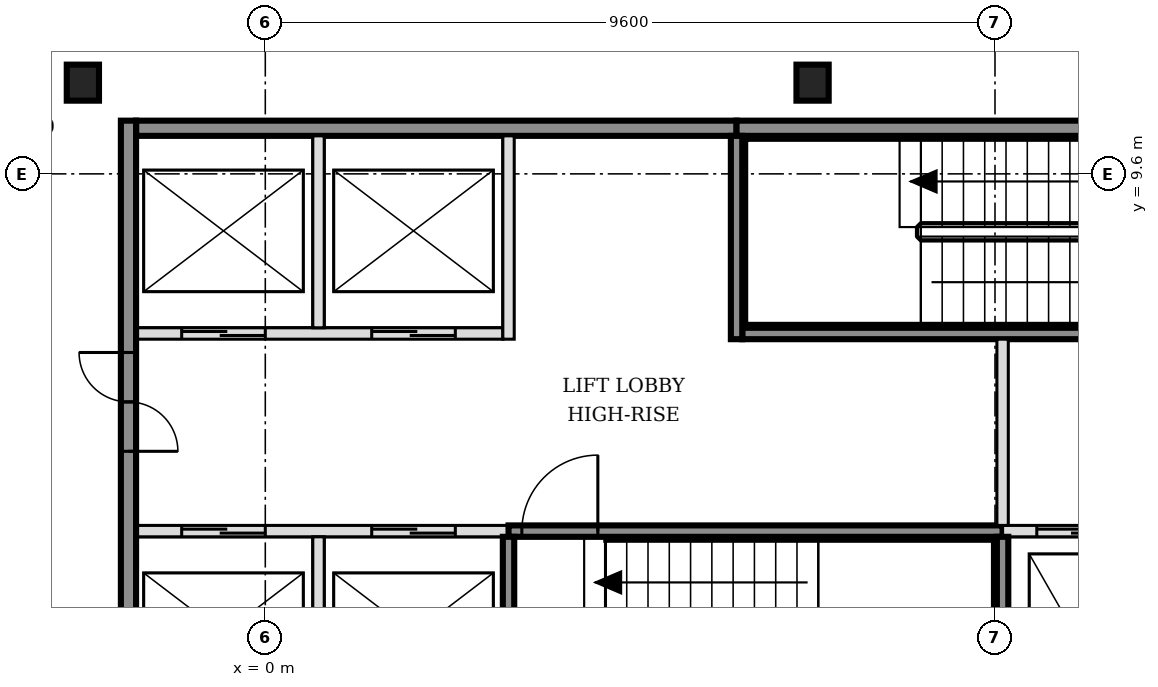
"""IFC4 building model, lengths in metres.
Left out: names, types, materials, properties, quantities, classifications, styles, units other than length and angle.
Written with IfcOpenShell. Run it as: python <this file> out.ifc"""

import sys

from ifc_helpers import new_model, si_unit, direction, frame, frame_2d, origin, origin_2d, place, context, subcontext, project, spatial, rectangle, i_section, extrude, element, fill, save


model = new_model("IFC4")
c1 = context("Model", 3, precision=1e-05, world=origin(), true_north=direction((0.0, 1.0)))
c2 = subcontext(c1, "Body", "Model", "MODEL_VIEW")
j1 = project(units=[si_unit("LENGTHUNIT", "METRE"), si_unit("PLANEANGLEUNIT", "RADIAN")], contexts=[c1])
p1 = place(None, origin())
s1 = spatial("IfcSite", under=j1, at=p1, CompositionType="ELEMENT")
p2 = place(p1, origin())
s2 = spatial("IfcBuilding", under=s1, at=p2, CompositionType="ELEMENT")
p3 = place(p2, frame((0.0, 0.0, 136.2)))
s3 = spatial("IfcBuildingStorey", under=s2, at=p3, CompositionType="ELEMENT", Elevation=136.2)
for number, where, z_axis, x_axis in (
    (1, (-2.4, 10.8, -0.15), (0.0, 0.0, 1.0), (1.0, 0.0, 0.0)),
    (2, (7.2, 10.8, -0.15), (0.0, 0.0, 1.0), (1.0, 0.0, 0.0)),
):
    element("IfcColumn", number, at=place(p3, frame(where, z_axis=z_axis, x_axis=x_axis)), inside=s3, PredefinedType="COLUMN", context=c2, shape_type="SweptSolid", body=[
        extrude(i_section(OverallWidth=0.424, OverallDepth=0.474, WebThickness=0.048, FlangeThickness=0.077, FilletRadius=0.015, at=origin_2d()), origin(), (0.0, 0.0, 1.0), 3.6),
    ])
p4 = place(p3, frame((-1.7, 4.9, 0.0), z_axis=(0.0, 0.0, 1.0), x_axis=(1.0, 0.0, 0.0)))
e3 = element("IfcWall", 3, at=p4, inside=s3, PredefinedType="SOLIDWALL", context=c2, shape_type="SweptSolid", body=[
    extrude(rectangle(XDim=4.9, YDim=0.15, at=frame_2d((2.45, 0.0))), origin(), (0.0, 0.0, 1.0), 3.45),
])
p5 = place(p4, frame((0.6, 0.0, 0.0)))
e4 = element("IfcOpeningElement", 4, at=p5, cuts=e3, PredefinedType="OPENING", context=c2, shape_type="SweptSolid", body=[
    extrude(rectangle(XDim=1.1, YDim=2.1, at=frame_2d((0.55, 1.05))), frame((0.0, 0.085, 0.0), z_axis=(0.0, -1.0, 0.0), x_axis=(1.0, 0.0, 0.0)), (0.0, 0.0, 1.0), 0.17),
])
p6 = place(p4, frame((3.1, 0.0, 0.0)))
e5 = element("IfcOpeningElement", 5, at=p6, cuts=e3, PredefinedType="OPENING", context=c2, shape_type="SweptSolid", body=[
    extrude(rectangle(XDim=1.1, YDim=2.1, at=frame_2d((0.55, 1.05))), frame((0.0, 0.085, 0.0), z_axis=(0.0, -1.0, 0.0), x_axis=(1.0, 0.0, 0.0)), (0.0, 0.0, 1.0), 0.17),
])
p7 = place(p3, frame((3.2, 4.9, 0.0), z_axis=(0.0, 0.0, 1.0), x_axis=(1.0, 0.0, 0.0)))
e6 = element("IfcWall", 6, at=p7, inside=s3, PredefinedType="SOLIDWALL", context=c2, shape_type="SweptSolid", body=[
    extrude(rectangle(XDim=6.5, YDim=0.15, at=frame_2d((3.25, 0.0))), origin(), (0.0, 0.0, 1.0), 3.45),
])
p8 = place(p7, frame((0.175, 0.0, 0.0)))
e7 = element("IfcOpeningElement", 7, at=p8, cuts=e6, PredefinedType="OPENING", context=c2, shape_type="SweptSolid", body=[
    extrude(rectangle(XDim=1.0, YDim=2.1, at=frame_2d((0.5, 1.05))), frame((0.0, 0.085, 0.0), z_axis=(0.0, -1.0, 0.0), x_axis=(1.0, 0.0, 0.0)), (0.0, 0.0, 1.0), 0.17),
])
p9 = place(p3, frame((9.7, 4.9, 0.0), z_axis=(0.0, 0.0, 1.0), x_axis=(1.0, 0.0, 0.0)))
e8 = element("IfcWall", 8, at=p9, inside=s3, PredefinedType="SOLIDWALL", context=c2, shape_type="SweptSolid", body=[
    extrude(rectangle(XDim=6.4, YDim=0.15, at=frame_2d((3.2, 0.0))), origin(), (0.0, 0.0, 1.0), 3.45),
])
p10 = place(p9, frame((0.45, 0.0, 0.0)))
e9 = element("IfcOpeningElement", 9, at=p10, cuts=e8, PredefinedType="OPENING", context=c2, shape_type="SweptSolid", body=[
    extrude(rectangle(XDim=1.0, YDim=2.1, at=frame_2d((0.5, 1.05))), frame((0.0, 0.085, 0.0), z_axis=(0.0, -1.0, 0.0), x_axis=(1.0, 0.0, 0.0)), (0.0, 0.0, 1.0), 0.17),
])
p11 = place(p9, frame((2.35, 0.0, 0.0)))
e10 = element("IfcOpeningElement", 10, at=p11, cuts=e8, PredefinedType="OPENING", context=c2, shape_type="SweptSolid", body=[
    extrude(rectangle(XDim=1.0, YDim=2.1, at=frame_2d((0.5, 1.05))), frame((0.0, 0.085, 0.0), z_axis=(0.0, -1.0, 0.0), x_axis=(1.0, 0.0, 0.0)), (0.0, 0.0, 1.0), 0.17),
])
p12 = place(p9, frame((4.7, 0.0, 0.0)))
e11 = element("IfcOpeningElement", 11, at=p12, cuts=e8, PredefinedType="OPENING", context=c2, shape_type="SweptSolid", body=[
    extrude(rectangle(XDim=0.9, YDim=2.1, at=frame_2d((0.45, 1.05))), frame((0.0, 0.085, 0.0), z_axis=(0.0, -1.0, 0.0), x_axis=(1.0, 0.0, 0.0)), (0.0, 0.0, 1.0), 0.17),
])
p13 = place(p3, frame((-1.7, 7.5, 0.0), z_axis=(0.0, 0.0, 1.0), x_axis=(1.0, 0.0, 0.0)))
e12 = element("IfcWall", 12, at=p13, inside=s3, PredefinedType="SOLIDWALL", context=c2, shape_type="SweptSolid", body=[
    extrude(rectangle(XDim=4.825, YDim=0.15, at=frame_2d((2.413, 0.0))), origin(), (0.0, 0.0, 1.0), 3.45),
])
p14 = place(p13, frame((0.6, 0.0, 0.0)))
e13 = element("IfcOpeningElement", 13, at=p14, cuts=e12, PredefinedType="OPENING", context=c2, shape_type="SweptSolid", body=[
    extrude(rectangle(XDim=1.1, YDim=2.1, at=frame_2d((0.55, 1.05))), frame((0.0, 0.085, 0.0), z_axis=(0.0, -1.0, 0.0), x_axis=(1.0, 0.0, 0.0)), (0.0, 0.0, 1.0), 0.17),
])
p15 = place(p13, frame((3.1, 0.0, 0.0)))
e14 = element("IfcOpeningElement", 14, at=p15, cuts=e12, PredefinedType="OPENING", context=c2, shape_type="SweptSolid", body=[
    extrude(rectangle(XDim=1.1, YDim=2.1, at=frame_2d((0.55, 1.05))), frame((0.0, 0.085, 0.0), z_axis=(0.0, -1.0, 0.0), x_axis=(1.0, 0.0, 0.0)), (0.0, 0.0, 1.0), 0.17),
])
p16 = place(p3, frame((6.275, 7.5, 0.0), z_axis=(0.0, 0.0, 1.0), x_axis=(1.0, 0.0, 0.0)))
e15 = element("IfcWall", 15, at=p16, inside=s3, PredefinedType="SOLIDWALL", context=c2, shape_type="SweptSolid", body=[
    extrude(rectangle(XDim=6.425, YDim=0.15, at=frame_2d((3.212, 0.0))), origin(), (0.0, 0.0, 1.0), 3.45),
])
p17 = place(p16, frame((5.225, 0.0, 0.0)))
e16 = element("IfcOpeningElement", 16, at=p17, cuts=e15, PredefinedType="OPENING", context=c2, shape_type="SweptSolid", body=[
    extrude(rectangle(XDim=1.0, YDim=2.1, at=frame_2d((0.5, 1.05))), frame((0.0, 0.085, 0.0), z_axis=(0.0, -1.0, 0.0), x_axis=(1.0, 0.0, 0.0)), (0.0, 0.0, 1.0), 0.17),
])
p18 = place(p3, frame((-1.7, 10.2, 0.0), z_axis=(0.0, 0.0, 1.0), x_axis=(1.0, 0.0, 0.0)))
e17 = element("IfcWall", 17, at=p18, inside=s3, PredefinedType="SOLIDWALL", context=c2, shape_type="SweptSolid", body=[
    extrude(rectangle(XDim=7.9, YDim=0.2, at=frame_2d((3.95, 0.0))), origin(), (0.0, 0.0, 1.0), 3.45),
])
p19 = place(p3, frame((6.2, 10.2, 0.0), z_axis=(0.0, 0.0, 1.0), x_axis=(1.0, 0.0, 0.0)))
e18 = element("IfcWall", 18, at=p19, inside=s3, PredefinedType="SOLIDWALL", context=c2, shape_type="SweptSolid", body=[
    extrude(rectangle(XDim=6.5, YDim=0.2, at=frame_2d((3.25, 0.0))), origin(), (0.0, 0.0, 1.0), 3.45),
])
p20 = place(p3, frame((-1.8, -5.5, 0.0), z_axis=(0.0, 0.0, 1.0), x_axis=(0.0, 1.0, 0.0)))
e19 = element("IfcWall", 19, at=p20, inside=s3, PredefinedType="SOLIDWALL", context=c2, shape_type="SweptSolid", body=[
    extrude(rectangle(XDim=15.8, YDim=0.2, at=frame_2d((7.9, 0.0))), origin(), (0.0, 0.0, 1.0), 3.45),
])
p21 = place(p20, frame((3.05, 0.0, 0.0)))
e20 = element("IfcOpeningElement", 20, at=p21, cuts=e19, PredefinedType="OPENING", context=c2, shape_type="SweptSolid", body=[
    extrude(rectangle(XDim=1.3, YDim=2.1, at=frame_2d((0.65, 1.05))), frame((0.0, 0.11, 0.0), z_axis=(0.0, -1.0, 0.0), x_axis=(1.0, 0.0, 0.0)), (0.0, 0.0, 1.0), 0.22),
])
p22 = place(p20, frame((11.45, 0.0, 0.0)))
e21 = element("IfcOpeningElement", 21, at=p22, cuts=e19, PredefinedType="OPENING", context=c2, shape_type="SweptSolid", body=[
    extrude(rectangle(XDim=1.3, YDim=2.1, at=frame_2d((0.65, 1.05))), frame((0.0, 0.11, 0.0), z_axis=(0.0, -1.0, 0.0), x_axis=(1.0, 0.0, 0.0)), (0.0, 0.0, 1.0), 0.22),
])
p23 = place(p3, frame((0.7, 2.275, 0.0), z_axis=(0.0, 0.0, 1.0), x_axis=(0.0, 1.0, 0.0)))
e22 = element("IfcWall", 22, at=p23, inside=s3, PredefinedType="SOLIDWALL", context=c2, shape_type="SweptSolid", body=[
    extrude(rectangle(XDim=2.55, YDim=0.15, at=frame_2d((1.275, 0.0))), origin(), (0.0, 0.0, 1.0), 3.45),
])
p24 = place(p3, frame((0.7, 7.575, 0.0), z_axis=(0.0, 0.0, 1.0), x_axis=(0.0, 1.0, 0.0)))
e23 = element("IfcWall", 23, at=p24, inside=s3, PredefinedType="SOLIDWALL", context=c2, shape_type="SweptSolid", body=[
    extrude(rectangle(XDim=2.525, YDim=0.15, at=frame_2d((1.263, 0.0))), origin(), (0.0, 0.0, 1.0), 3.45),
])
p25 = place(p3, frame((3.2, 2.275, 0.0), z_axis=(0.0, 0.0, 1.0), x_axis=(0.0, 1.0, 0.0)))
e24 = element("IfcWall", 24, at=p25, inside=s3, PredefinedType="SOLIDWALL", context=c2, shape_type="SweptSolid", body=[
    extrude(rectangle(XDim=2.55, YDim=0.15, at=frame_2d((1.275, 0.0))), origin(), (0.0, 0.0, 1.0), 3.45),
])
for number, where, z_axis, x_axis in (
    (25, (3.2, 7.425, 0.0), (0.0, 0.0, 1.0), (0.0, 1.0, 0.0)),
    (26, (6.2, 7.425, 0.0), (0.0, 0.0, 1.0), (0.0, 1.0, 0.0)),
):
    element("IfcWall", number, at=place(p3, frame(where, z_axis=z_axis, x_axis=x_axis)), inside=s3, PredefinedType="SOLIDWALL", context=c2, shape_type="SweptSolid", body=[
        extrude(rectangle(XDim=2.675, YDim=0.15, at=frame_2d((1.337, 0.0))), origin(), (0.0, 0.0, 1.0), 3.45),
    ])
p26 = place(p3, frame((9.7, 2.275, 0.0), z_axis=(0.0, 0.0, 1.0), x_axis=(0.0, 1.0, 0.0)))
e27 = element("IfcWall", 27, at=p26, inside=s3, PredefinedType="SOLIDWALL", context=c2, shape_type="SweptSolid", body=[
    extrude(rectangle(XDim=2.55, YDim=0.15, at=frame_2d((1.275, 0.0))), origin(), (0.0, 0.0, 1.0), 3.45),
])
p27 = place(p3, frame((9.7, 4.975, 0.0), z_axis=(0.0, 0.0, 1.0), x_axis=(0.0, 1.0, 0.0)))
e28 = element("IfcWall", 28, at=p27, inside=s3, PredefinedType="SOLIDWALL", context=c2, shape_type="SweptSolid", body=[
    extrude(rectangle(XDim=2.45, YDim=0.15, at=frame_2d((1.225, 0.0))), origin(), (0.0, 0.0, 1.0), 3.45),
])
p28 = place(p5, origin())
e29 = element("IfcDoor", 29, at=p28, inside=s3, OperationType="DOUBLE_DOOR_SLIDING", PredefinedType="DOOR", context=c2, shape_type="SweptSolid", body=[
    extrude(rectangle(XDim=1.1, YDim=2.1, at=frame_2d((0.55, 1.05))), frame((0.0, 0.025, 0.0), z_axis=(0.0, -1.0, 0.0), x_axis=(1.0, 0.0, 0.0)), (0.0, 0.0, 1.0), 0.05),
])
fill(e4, e29)
p29 = place(p6, origin())
e30 = element("IfcDoor", 30, at=p29, inside=s3, OperationType="DOUBLE_DOOR_SLIDING", PredefinedType="DOOR", context=c2, shape_type="SweptSolid", body=[
    extrude(rectangle(XDim=1.1, YDim=2.1, at=frame_2d((0.55, 1.05))), frame((0.0, 0.025, 0.0), z_axis=(0.0, -1.0, 0.0), x_axis=(1.0, 0.0, 0.0)), (0.0, 0.0, 1.0), 0.05),
])
fill(e5, e30)
p30 = place(p14, origin())
e31 = element("IfcDoor", 31, at=p30, inside=s3, OperationType="DOUBLE_DOOR_SLIDING", PredefinedType="DOOR", context=c2, shape_type="SweptSolid", body=[
    extrude(rectangle(XDim=1.1, YDim=2.1, at=frame_2d((0.55, 1.05))), frame((0.0, 0.025, 0.0), z_axis=(0.0, -1.0, 0.0), x_axis=(1.0, 0.0, 0.0)), (0.0, 0.0, 1.0), 0.05),
])
fill(e13, e31)
p31 = place(p15, origin())
e32 = element("IfcDoor", 32, at=p31, inside=s3, OperationType="DOUBLE_DOOR_SLIDING", PredefinedType="DOOR", context=c2, shape_type="SweptSolid", body=[
    extrude(rectangle(XDim=1.1, YDim=2.1, at=frame_2d((0.55, 1.05))), frame((0.0, 0.025, 0.0), z_axis=(0.0, -1.0, 0.0), x_axis=(1.0, 0.0, 0.0)), (0.0, 0.0, 1.0), 0.05),
])
fill(e14, e32)
p32 = place(p10, origin())
e33 = element("IfcDoor", 33, at=p32, inside=s3, OperationType="DOUBLE_DOOR_SLIDING", PredefinedType="DOOR", context=c2, shape_type="SweptSolid", body=[
    extrude(rectangle(XDim=1.0, YDim=2.1, at=frame_2d((0.5, 1.05))), frame((0.0, 0.025, 0.0), z_axis=(0.0, -1.0, 0.0), x_axis=(1.0, 0.0, 0.0)), (0.0, 0.0, 1.0), 0.05),
])
fill(e9, e33)
p33 = place(p8, origin())
e34 = element("IfcDoor", 34, at=p33, inside=s3, OperationType="SINGLE_SWING_RIGHT", PredefinedType="DOOR", context=c2, shape_type="SweptSolid", body=[
    extrude(rectangle(XDim=1.0, YDim=2.1, at=frame_2d((0.5, 1.05))), frame((0.0, 0.025, 0.0), z_axis=(0.0, -1.0, 0.0), x_axis=(1.0, 0.0, 0.0)), (0.0, 0.0, 1.0), 0.05),
])
fill(e7, e34)
p34 = place(p22, origin())
e35 = element("IfcDoor", 35, at=p34, inside=s3, OperationType="DOUBLE_DOOR_SINGLE_SWING", PredefinedType="DOOR", context=c2, shape_type="SweptSolid", body=[
    extrude(rectangle(XDim=1.3, YDim=2.1, at=frame_2d((0.65, 1.05))), frame((0.0, 0.025, 0.0), z_axis=(0.0, -1.0, 0.0), x_axis=(1.0, 0.0, 0.0)), (0.0, 0.0, 1.0), 0.05),
])
fill(e21, e35)
save(model, sys.argv[1])
